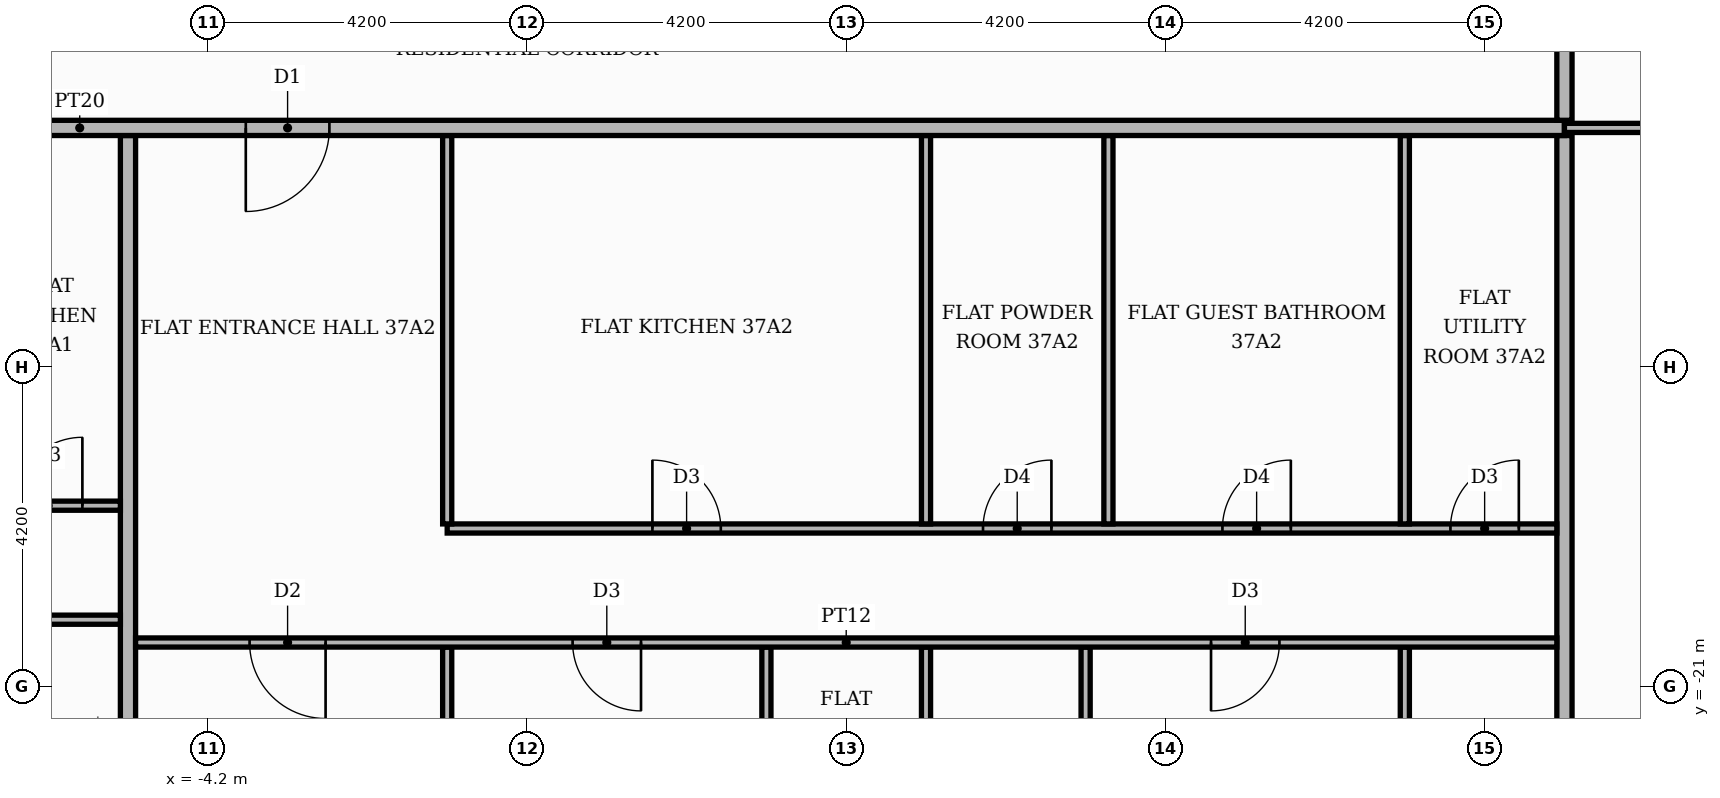
"""IFC4 building model, lengths in metres.
Left out: names, types, materials, properties, quantities, classifications, styles, units other than length and angle.
Written with IfcOpenShell. Run it as: python <this file> out.ifc"""

import sys

from ifc_helpers import new_model, si_unit, direction, frame, frame_2d, origin, place, context, subcontext, project, spatial, rectangle, extrude, element, fill, save


model = new_model("IFC4")
c1 = context("Model", 3, precision=1e-05, world=origin(), true_north=direction((0.0, 1.0)))
c2 = subcontext(c1, "Body", "Model", "MODEL_VIEW")
j1 = project(units=[si_unit("LENGTHUNIT", "METRE"), si_unit("PLANEANGLEUNIT", "RADIAN")], contexts=[c1])
p1 = place(None, origin())
s1 = spatial("IfcSite", under=j1, at=p1, CompositionType="ELEMENT")
p2 = place(p1, origin())
s2 = spatial("IfcBuilding", under=s1, at=p2, CompositionType="ELEMENT")
p3 = place(p2, frame((0.0, 0.0, 157.2)))
s3 = spatial("IfcBuildingStorey", under=s2, at=p3, CompositionType="ELEMENT", Elevation=157.2)
p4 = place(p3, frame((-5.25, -25.42, 0.0), z_axis=(0.0, 0.0, 1.0), x_axis=(0.0, 1.0, 0.0)))
e1 = element("IfcWall", 1, at=p4, inside=s3, PredefinedType="PARTITIONING", context=c2, shape_type="SweptSolid", body=[
    extrude(rectangle(XDim=11.67, YDim=0.2, at=frame_2d((5.835, 0.0))), origin(), (0.0, 0.0, 1.0), 3.48),
])
p5 = place(p3, frame((-1.05, -25.42, 0.0), z_axis=(0.0, 0.0, 1.0), x_axis=(0.0, 1.0, 0.0)))
e2 = element("IfcWall", 2, at=p5, inside=s3, PredefinedType="PARTITIONING", context=c2, shape_type="SweptSolid", body=[
    extrude(rectangle(XDim=4.94, YDim=0.12, at=frame_2d((2.47, 0.0))), origin(), (0.0, 0.0, 1.0), 3.48),
])
p6 = place(p3, frame((3.15, -25.42, 0.0), z_axis=(0.0, 0.0, 1.0), x_axis=(0.0, 1.0, 0.0)))
e3 = element("IfcWall", 3, at=p6, inside=s3, PredefinedType="PARTITIONING", context=c2, shape_type="SweptSolid", body=[
    extrude(rectangle(XDim=4.94, YDim=0.12, at=frame_2d((2.47, 0.0))), origin(), (0.0, 0.0, 1.0), 3.48),
])
p7 = place(p6, frame((1.9, 0.0, 0.0)))
e4 = element("IfcOpeningElement", 4, at=p7, cuts=e3, PredefinedType="OPENING", context=c2, shape_type="SweptSolid", body=[
    extrude(rectangle(XDim=0.9, YDim=2.1, at=frame_2d((0.45, 1.05))), frame((0.0, 0.07, 0.0), z_axis=(0.0, -1.0, 0.0), x_axis=(1.0, 0.0, 0.0)), (0.0, 0.0, 1.0), 0.14),
])
p8 = place(p3, frame((5.25, -25.42, 0.0), z_axis=(0.0, 0.0, 1.0), x_axis=(0.0, 1.0, 0.0)))
e5 = element("IfcWall", 5, at=p8, inside=s3, PredefinedType="PARTITIONING", context=c2, shape_type="SweptSolid", body=[
    extrude(rectangle(XDim=4.94, YDim=0.12, at=frame_2d((2.47, 0.0))), origin(), (0.0, 0.0, 1.0), 3.48),
])
p9 = place(p8, frame((1.9, 0.0, 0.0)))
e6 = element("IfcOpeningElement", 6, at=p9, cuts=e5, PredefinedType="OPENING", context=c2, shape_type="SweptSolid", body=[
    extrude(rectangle(XDim=0.9, YDim=2.1, at=frame_2d((0.45, 1.05))), frame((0.0, 0.07, 0.0), z_axis=(0.0, -1.0, 0.0), x_axis=(1.0, 0.0, 0.0)), (0.0, 0.0, 1.0), 0.14),
])
p10 = place(p3, frame((7.35, -25.42, 0.0), z_axis=(0.0, 0.0, 1.0), x_axis=(0.0, 1.0, 0.0)))
e7 = element("IfcWall", 7, at=p10, inside=s3, PredefinedType="PARTITIONING", context=c2, shape_type="SweptSolid", body=[
    extrude(rectangle(XDim=4.94, YDim=0.12, at=frame_2d((2.47, 0.0))), origin(), (0.0, 0.0, 1.0), 3.48),
])
p11 = place(p3, frame((11.55, -25.42, 0.0), z_axis=(0.0, 0.0, 1.0), x_axis=(0.0, 1.0, 0.0)))
e8 = element("IfcWall", 8, at=p11, inside=s3, PredefinedType="PARTITIONING", context=c2, shape_type="SweptSolid", body=[
    extrude(rectangle(XDim=4.94, YDim=0.12, at=frame_2d((2.47, 0.0))), origin(), (0.0, 0.0, 1.0), 3.48),
])
p12 = place(p11, frame((1.9, 0.0, 0.0)))
e9 = element("IfcOpeningElement", 9, at=p12, cuts=e8, PredefinedType="OPENING", context=c2, shape_type="SweptSolid", body=[
    extrude(rectangle(XDim=0.9, YDim=2.1, at=frame_2d((0.45, 1.05))), frame((0.0, 0.07, 0.0), z_axis=(0.0, -1.0, 0.0), x_axis=(1.0, 0.0, 0.0)), (0.0, 0.0, 1.0), 0.14),
])
p13 = place(p3, frame((13.65, -25.42, 0.0), z_axis=(0.0, 0.0, 1.0), x_axis=(0.0, 1.0, 0.0)))
e10 = element("IfcWall", 10, at=p13, inside=s3, PredefinedType="PARTITIONING", context=c2, shape_type="SweptSolid", body=[
    extrude(rectangle(XDim=11.67, YDim=0.2, at=frame_2d((5.835, 0.0))), origin(), (0.0, 0.0, 1.0), 3.48),
])
p14 = place(p3, frame((-5.15, -20.42, 0.0), z_axis=(0.0, 0.0, 1.0), x_axis=(1.0, 0.0, 0.0)))
e11 = element("IfcWall", 11, at=p14, inside=s3, PredefinedType="PARTITIONING", context=c2, shape_type="SweptSolid", body=[
    extrude(rectangle(XDim=18.7, YDim=0.12, at=frame_2d((9.35, 0.0))), origin(), (0.0, 0.0, 1.0), 3.48),
])
p15 = place(p14, frame((1.5, 0.0, 0.0)))
e12 = element("IfcOpeningElement", 12, at=p15, cuts=e11, PredefinedType="OPENING", context=c2, shape_type="SweptSolid", body=[
    extrude(rectangle(XDim=1.0, YDim=2.1, at=frame_2d((0.5, 1.05))), frame((0.0, 0.07, 0.0), z_axis=(0.0, -1.0, 0.0), x_axis=(1.0, 0.0, 0.0)), (0.0, 0.0, 1.0), 0.14),
])
p16 = place(p14, frame((5.75, 0.0, 0.0)))
e13 = element("IfcOpeningElement", 13, at=p16, cuts=e11, PredefinedType="OPENING", context=c2, shape_type="SweptSolid", body=[
    extrude(rectangle(XDim=0.9, YDim=2.1, at=frame_2d((0.45, 1.05))), frame((0.0, 0.07, 0.0), z_axis=(0.0, -1.0, 0.0), x_axis=(1.0, 0.0, 0.0)), (0.0, 0.0, 1.0), 0.14),
])
p17 = place(p14, frame((14.15, 0.0, 0.0)))
e14 = element("IfcOpeningElement", 14, at=p17, cuts=e11, PredefinedType="OPENING", context=c2, shape_type="SweptSolid", body=[
    extrude(rectangle(XDim=0.9, YDim=2.1, at=frame_2d((0.45, 1.05))), frame((0.0, 0.07, 0.0), z_axis=(0.0, -1.0, 0.0), x_axis=(1.0, 0.0, 0.0)), (0.0, 0.0, 1.0), 0.14),
])
p18 = place(p3, frame((-25.42, -20.12, 0.0), z_axis=(0.0, 0.0, 1.0), x_axis=(1.0, 0.0, 0.0)))
e15 = element("IfcWall", 15, at=p18, inside=s3, PredefinedType="PARTITIONING", context=c2, shape_type="SweptSolid", body=[
    extrude(rectangle(XDim=20.07, YDim=0.12, at=frame_2d((10.035, 0.0))), origin(), (0.0, 0.0, 1.0), 3.48),
])
p19 = place(p18, frame((10.22, 0.0, 0.0)))
e16 = element("IfcOpeningElement", 16, at=p19, cuts=e15, PredefinedType="OPENING", context=c2, shape_type="SweptSolid", body=[
    extrude(rectangle(XDim=1.0, YDim=2.1, at=frame_2d((0.5, 1.05))), frame((0.0, 0.07, 0.0), z_axis=(0.0, -1.0, 0.0), x_axis=(1.0, 0.0, 0.0)), (0.0, 0.0, 1.0), 0.14),
])
p20 = place(p18, frame((13.42, 0.0, 0.0)))
e17 = element("IfcOpeningElement", 17, at=p20, cuts=e15, PredefinedType="OPENING", context=c2, shape_type="SweptSolid", body=[
    extrude(rectangle(XDim=0.9, YDim=2.1, at=frame_2d((0.45, 1.05))), frame((0.0, 0.07, 0.0), z_axis=(0.0, -1.0, 0.0), x_axis=(1.0, 0.0, 0.0)), (0.0, 0.0, 1.0), 0.14),
])
p21 = place(p3, frame((-1.05, -18.92, 0.0), z_axis=(0.0, 0.0, 1.0), x_axis=(1.0, 0.0, 0.0)))
e18 = element("IfcWall", 18, at=p21, inside=s3, PredefinedType="PARTITIONING", context=c2, shape_type="SweptSolid", body=[
    extrude(rectangle(XDim=14.6, YDim=0.12, at=frame_2d((7.3, 0.0))), origin(), (0.0, 0.0, 1.0), 3.48),
])
p22 = place(p21, frame((2.7, 0.0, 0.0)))
e19 = element("IfcOpeningElement", 19, at=p22, cuts=e18, PredefinedType="OPENING", context=c2, shape_type="SweptSolid", body=[
    extrude(rectangle(XDim=0.9, YDim=2.1, at=frame_2d((0.45, 1.05))), frame((0.0, 0.07, 0.0), z_axis=(0.0, -1.0, 0.0), x_axis=(1.0, 0.0, 0.0)), (0.0, 0.0, 1.0), 0.14),
])
p23 = place(p21, frame((7.05, 0.0, 0.0)))
e20 = element("IfcOpeningElement", 20, at=p23, cuts=e18, PredefinedType="OPENING", context=c2, shape_type="SweptSolid", body=[
    extrude(rectangle(XDim=0.9, YDim=2.1, at=frame_2d((0.45, 1.05))), frame((0.0, 0.07, 0.0), z_axis=(0.0, -1.0, 0.0), x_axis=(1.0, 0.0, 0.0)), (0.0, 0.0, 1.0), 0.14),
])
p24 = place(p21, frame((10.2, 0.0, 0.0)))
e21 = element("IfcOpeningElement", 21, at=p24, cuts=e18, PredefinedType="OPENING", context=c2, shape_type="SweptSolid", body=[
    extrude(rectangle(XDim=0.9, YDim=2.1, at=frame_2d((0.45, 1.05))), frame((0.0, 0.07, 0.0), z_axis=(0.0, -1.0, 0.0), x_axis=(1.0, 0.0, 0.0)), (0.0, 0.0, 1.0), 0.14),
])
p25 = place(p21, frame((13.2, 0.0, 0.0)))
e22 = element("IfcOpeningElement", 22, at=p25, cuts=e18, PredefinedType="OPENING", context=c2, shape_type="SweptSolid", body=[
    extrude(rectangle(XDim=0.9, YDim=2.1, at=frame_2d((0.45, 1.05))), frame((0.0, 0.07, 0.0), z_axis=(0.0, -1.0, 0.0), x_axis=(1.0, 0.0, 0.0)), (0.0, 0.0, 1.0), 0.14),
])
for number, where, z_axis, x_axis in (
    (23, (-1.05, -18.86, 0.0), (0.0, 0.0, 1.0), (0.0, 1.0, 0.0)),
    (24, (5.25, -18.86, 0.0), (0.0, 0.0, 1.0), (0.0, 1.0, 0.0)),
    (25, (7.65, -18.86, 0.0), (0.0, 0.0, 1.0), (0.0, 1.0, 0.0)),
    (26, (11.55, -18.86, 0.0), (0.0, 0.0, 1.0), (0.0, 1.0, 0.0)),
):
    element("IfcWall", number, at=place(p3, frame(where, z_axis=z_axis, x_axis=x_axis)), inside=s3, PredefinedType="PARTITIONING", context=c2, shape_type="SweptSolid", body=[
        extrude(rectangle(XDim=5.11, YDim=0.12, at=frame_2d((2.555, 0.0))), origin(), (0.0, 0.0, 1.0), 3.48),
    ])
p26 = place(p3, frame((-9.45, -18.62, 0.0), z_axis=(0.0, 0.0, 1.0), x_axis=(1.0, 0.0, 0.0)))
e27 = element("IfcWall", 27, at=p26, inside=s3, PredefinedType="PARTITIONING", context=c2, shape_type="SweptSolid", body=[
    extrude(rectangle(XDim=4.1, YDim=0.12, at=frame_2d((2.05, 0.0))), origin(), (0.0, 0.0, 1.0), 3.48),
])
p27 = place(p26, frame((2.7, 0.0, 0.0)))
e28 = element("IfcOpeningElement", 28, at=p27, cuts=e27, PredefinedType="OPENING", context=c2, shape_type="SweptSolid", body=[
    extrude(rectangle(XDim=0.9, YDim=2.1, at=frame_2d((0.45, 1.05))), frame((0.0, 0.07, 0.0), z_axis=(0.0, -1.0, 0.0), x_axis=(1.0, 0.0, 0.0)), (0.0, 0.0, 1.0), 0.14),
])
p28 = place(p3, frame((-25.42, -13.65, 0.0), z_axis=(0.0, 0.0, 1.0), x_axis=(1.0, 0.0, 0.0)))
e29 = element("IfcWall", 29, at=p28, inside=s3, PredefinedType="PARTITIONING", context=c2, shape_type="SweptSolid", body=[
    extrude(rectangle(XDim=39.07, YDim=0.2, at=frame_2d((19.535, 0.0))), origin(), (0.0, 0.0, 1.0), 3.48),
])
p29 = place(p28, frame((13.32, 0.0, 0.0)))
e30 = element("IfcOpeningElement", 30, at=p29, cuts=e29, PredefinedType="OPENING", context=c2, shape_type="SweptSolid", body=[
    extrude(rectangle(XDim=1.1, YDim=2.4, at=frame_2d((0.55, 1.2))), frame((0.0, 0.11, 0.0), z_axis=(0.0, -1.0, 0.0), x_axis=(1.0, 0.0, 0.0)), (0.0, 0.0, 1.0), 0.22),
])
p30 = place(p28, frame((21.72, 0.0, 0.0)))
e31 = element("IfcOpeningElement", 31, at=p30, cuts=e29, PredefinedType="OPENING", context=c2, shape_type="SweptSolid", body=[
    extrude(rectangle(XDim=1.1, YDim=2.4, at=frame_2d((0.55, 1.2))), frame((0.0, 0.11, 0.0), z_axis=(0.0, -1.0, 0.0), x_axis=(1.0, 0.0, 0.0)), (0.0, 0.0, 1.0), 0.22),
])
p31 = place(p3, frame((13.65, -13.65, 0.0), z_axis=(0.0, 0.0, 1.0), x_axis=(1.0, 0.0, 0.0)))
e32 = element("IfcWall", 32, at=p31, inside=s3, PredefinedType="PARTITIONING", context=c2, shape_type="SweptSolid", body=[
    extrude(rectangle(XDim=6.47, YDim=0.12, at=frame_2d((3.235, 0.0))), origin(), (0.0, 0.0, 1.0), 3.48),
])
p32 = place(p31, frame((2.785, 0.0, 0.0)))
e33 = element("IfcOpeningElement", 33, at=p32, cuts=e32, PredefinedType="OPENING", context=c2, shape_type="SweptSolid", body=[
    extrude(rectangle(XDim=0.9, YDim=2.1, at=frame_2d((0.45, 1.05))), frame((0.0, 0.07, 0.0), z_axis=(0.0, -1.0, 0.0), x_axis=(1.0, 0.0, 0.0)), (0.0, 0.0, 1.0), 0.14),
])
p33 = place(p3, frame((13.65, -13.55, 0.0), z_axis=(0.0, 0.0, 1.0), x_axis=(0.0, 1.0, 0.0)))
e34 = element("IfcWall", 34, at=p33, inside=s3, PredefinedType="PARTITIONING", context=c2, shape_type="SweptSolid", body=[
    extrude(rectangle(XDim=2.45, YDim=0.2, at=frame_2d((1.225, 0.0))), origin(), (0.0, 0.0, 1.0), 3.48),
])
p34 = place(p27, origin())
e35 = element("IfcDoor", 35, at=p34, inside=s3, OperationType="SINGLE_SWING_RIGHT", PredefinedType="DOOR", context=c2, shape_type="SweptSolid", body=[
    extrude(rectangle(XDim=0.9, YDim=2.1, at=frame_2d((0.45, 1.05))), frame((0.0, 0.025, 0.0), z_axis=(0.0, -1.0, 0.0), x_axis=(1.0, 0.0, 0.0)), (0.0, 0.0, 1.0), 0.05),
])
fill(e28, e35)
p35 = place(p30, frame((1.1, 0.0, 0.0), z_axis=(0.0, 0.0, 1.0), x_axis=(-1.0, 0.0, 0.0)))
e36 = element("IfcDoor", 36, at=p35, inside=s3, OperationType="SINGLE_SWING_LEFT", PredefinedType="DOOR", context=c2, shape_type="SweptSolid", body=[
    extrude(rectangle(XDim=1.1, YDim=2.4, at=frame_2d((0.55, 1.2))), frame((0.0, 0.025, 0.0), z_axis=(0.0, -1.0, 0.0), x_axis=(1.0, 0.0, 0.0)), (0.0, 0.0, 1.0), 0.05),
])
fill(e31, e36)
p36 = place(p22, origin())
e37 = element("IfcDoor", 37, at=p36, inside=s3, OperationType="SINGLE_SWING_LEFT", PredefinedType="DOOR", context=c2, shape_type="SweptSolid", body=[
    extrude(rectangle(XDim=0.9, YDim=2.1, at=frame_2d((0.45, 1.05))), frame((0.0, 0.025, 0.0), z_axis=(0.0, -1.0, 0.0), x_axis=(1.0, 0.0, 0.0)), (0.0, 0.0, 1.0), 0.05),
])
fill(e19, e37)
p37 = place(p23, origin())
e38 = element("IfcDoor", 38, at=p37, inside=s3, OperationType="SINGLE_SWING_RIGHT", PredefinedType="DOOR", context=c2, shape_type="SweptSolid", body=[
    extrude(rectangle(XDim=0.9, YDim=2.1, at=frame_2d((0.45, 1.05))), frame((0.0, 0.025, 0.0), z_axis=(0.0, -1.0, 0.0), x_axis=(1.0, 0.0, 0.0)), (0.0, 0.0, 1.0), 0.05),
])
fill(e20, e38)
p38 = place(p24, origin())
e39 = element("IfcDoor", 39, at=p38, inside=s3, OperationType="SINGLE_SWING_RIGHT", PredefinedType="DOOR", context=c2, shape_type="SweptSolid", body=[
    extrude(rectangle(XDim=0.9, YDim=2.1, at=frame_2d((0.45, 1.05))), frame((0.0, 0.025, 0.0), z_axis=(0.0, -1.0, 0.0), x_axis=(1.0, 0.0, 0.0)), (0.0, 0.0, 1.0), 0.05),
])
fill(e21, e39)
p39 = place(p25, origin())
e40 = element("IfcDoor", 40, at=p39, inside=s3, OperationType="SINGLE_SWING_RIGHT", PredefinedType="DOOR", context=c2, shape_type="SweptSolid", body=[
    extrude(rectangle(XDim=0.9, YDim=2.1, at=frame_2d((0.45, 1.05))), frame((0.0, 0.025, 0.0), z_axis=(0.0, -1.0, 0.0), x_axis=(1.0, 0.0, 0.0)), (0.0, 0.0, 1.0), 0.05),
])
fill(e22, e40)
p40 = place(p15, frame((1.0, 0.0, 0.0), z_axis=(0.0, 0.0, 1.0), x_axis=(-1.0, 0.0, 0.0)))
e41 = element("IfcDoor", 41, at=p40, inside=s3, OperationType="SINGLE_SWING_RIGHT", PredefinedType="DOOR", context=c2, shape_type="SweptSolid", body=[
    extrude(rectangle(XDim=1.0, YDim=2.1, at=frame_2d((0.5, 1.05))), frame((0.0, 0.025, 0.0), z_axis=(0.0, -1.0, 0.0), x_axis=(1.0, 0.0, 0.0)), (0.0, 0.0, 1.0), 0.05),
])
fill(e12, e41)
p41 = place(p16, frame((0.9, 0.0, 0.0), z_axis=(0.0, 0.0, 1.0), x_axis=(-1.0, 0.0, 0.0)))
e42 = element("IfcDoor", 42, at=p41, inside=s3, OperationType="SINGLE_SWING_RIGHT", PredefinedType="DOOR", context=c2, shape_type="SweptSolid", body=[
    extrude(rectangle(XDim=0.9, YDim=2.1, at=frame_2d((0.45, 1.05))), frame((0.0, 0.025, 0.0), z_axis=(0.0, -1.0, 0.0), x_axis=(1.0, 0.0, 0.0)), (0.0, 0.0, 1.0), 0.05),
])
fill(e13, e42)
p42 = place(p17, frame((0.9, 0.0, 0.0), z_axis=(0.0, 0.0, 1.0), x_axis=(-1.0, 0.0, 0.0)))
e43 = element("IfcDoor", 43, at=p42, inside=s3, OperationType="SINGLE_SWING_LEFT", PredefinedType="DOOR", context=c2, shape_type="SweptSolid", body=[
    extrude(rectangle(XDim=0.9, YDim=2.1, at=frame_2d((0.45, 1.05))), frame((0.0, 0.025, 0.0), z_axis=(0.0, -1.0, 0.0), x_axis=(1.0, 0.0, 0.0)), (0.0, 0.0, 1.0), 0.05),
])
fill(e14, e43)
save(model, sys.argv[1])
